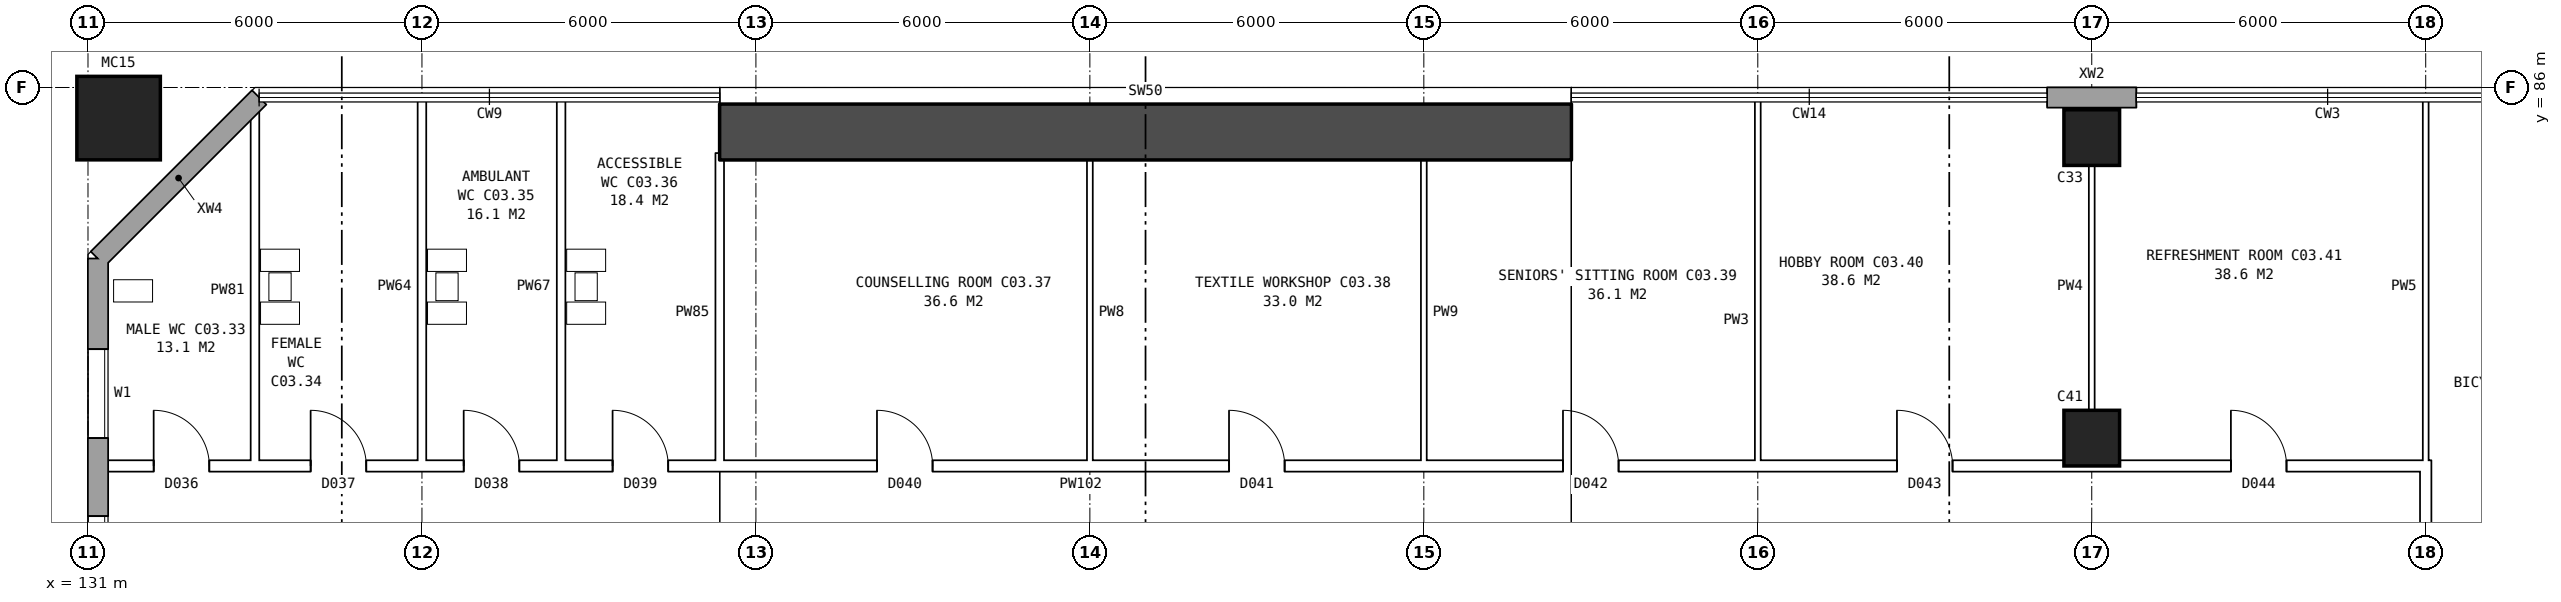
"""IFC4 building model, lengths in metres.
Left out: names, types, materials, properties, quantities, classifications, styles, units other than length and angle.
Written with IfcOpenShell. Run it as: python <this file> out.ifc"""

import sys

from ifc_helpers import new_model, si_unit, direction, frame, frame_2d, origin, origin_2d, place, context, subcontext, project, spatial, rectangle, hollow_rectangle, extrude, element, fill, save


model = new_model("IFC4")
c1 = context("Model", 3, precision=1e-05, world=origin(), true_north=direction((0.0, 1.0)))
c2 = subcontext(c1, "Body", "Model", "MODEL_VIEW")
j1 = project(units=[si_unit("LENGTHUNIT", "METRE"), si_unit("PLANEANGLEUNIT", "RADIAN")], contexts=[c1])
p1 = place(None, origin())
s1 = spatial("IfcSite", under=j1, at=p1, CompositionType="ELEMENT")
p2 = place(p1, origin())
s2 = spatial("IfcBuilding", under=s1, at=p2, CompositionType="ELEMENT")
p3 = place(p2, frame((0.0, 0.0, 14.7)))
s3 = spatial("IfcBuildingStorey", under=s2, at=p3, CompositionType="ELEMENT", Elevation=14.7)
p4 = place(p3, frame((142.35, 85.2, 0.0), z_axis=(0.0, 0.0, 1.0), x_axis=(1.0, 0.0, 0.0)))
e1 = element("IfcWall", 1, at=p4, inside=s3, PredefinedType="SHEAR", context=c2, shape_type="SweptSolid", body=[
    extrude(rectangle(XDim=15.3, YDim=1.0, at=frame_2d((7.65, 0.0))), origin(), (0.0, 0.0, 1.0), 4.0),
])
for number, where, z_axis, x_axis in (
    (2, (167.0, 79.7, 0.0), (0.0, 0.0, 1.0), (1.0, 0.0, 0.0)),
    (3, (167.0, 85.1, 0.0), (0.0, 0.0, 1.0), (1.0, 0.0, 0.0)),
):
    element("IfcColumn", number, at=place(p3, frame(where, z_axis=z_axis, x_axis=x_axis)), inside=s3, PredefinedType="COLUMN", context=c2, shape_type="SweptSolid", body=[
        extrude(rectangle(XDim=1.0, YDim=1.0, at=origin_2d()), origin(), (0.0, 0.0, 1.0), 4.0),
    ])
p5 = place(p3, frame((131.55, 85.45, 0.0), z_axis=(0.0, 0.0, 1.0), x_axis=(1.0, 0.0, 0.0)))
e4 = element("IfcColumn", 4, at=p5, inside=s3, PredefinedType="COLUMN", context=c2, shape_type="SweptSolid", body=[
    extrude(hollow_rectangle(XDim=1.5, YDim=1.5, WallThickness=0.08, at=origin_2d()), origin(), (0.0, 0.0, 1.0), 4.8),
])
p6 = place(p3, frame((167.8, 85.82, 0.0), z_axis=(0.0, 0.0, 1.0), x_axis=(-1.0, 0.0, 0.0)))
e5 = element("IfcWall", 5, at=p6, inside=s3, PredefinedType="STANDARD", context=c2, shape_type="SweptSolid", body=[
    extrude(rectangle(XDim=1.6, YDim=0.36, at=frame_2d((0.8, 0.0))), origin(), (0.0, 0.0, 1.0), 4.0),
])
p7 = place(p3, frame((134.075, 85.82, 0.0), z_axis=(0.0, 0.0, 1.0), x_axis=(-0.707106781187, -0.707106781187, 0.0)))
e6 = element("IfcWall", 6, at=p7, inside=s3, PredefinedType="STANDARD", context=c2, shape_type="SweptSolid", body=[
    extrude(rectangle(XDim=4.094, YDim=0.36, at=frame_2d((2.047, 0.0))), origin(), (0.0, 0.0, 1.0), 4.0),
])
p8 = place(p3, frame((131.18, 82.925, 0.0), z_axis=(0.0, 0.0, 1.0), x_axis=(0.0, -1.0, 0.0)))
e7 = element("IfcWall", 7, at=p8, inside=s3, PredefinedType="STANDARD", context=c2, shape_type="SweptSolid", body=[
    extrude(rectangle(XDim=25.851, YDim=0.36, at=frame_2d((12.925, 0.0))), origin(), (0.0, 0.0, 1.0), 4.0),
])
p9 = place(p8, frame((1.625, 0.0, 0.8)))
e8 = element("IfcOpeningElement", 8, at=p9, cuts=e7, PredefinedType="OPENING", context=c2, shape_type="SweptSolid", body=[
    extrude(rectangle(XDim=1.6, YDim=1.8, at=frame_2d((0.8, 0.9))), frame((0.0, 0.19, 0.0), z_axis=(0.0, -1.0, 0.0), x_axis=(1.0, 0.0, 0.0)), (0.0, 0.0, 1.0), 0.38),
])
p10 = place(p8, frame((4.625, 0.0, 0.8)))
e9 = element("IfcOpeningElement", 9, at=p10, cuts=e7, PredefinedType="OPENING", context=c2, shape_type="SweptSolid", body=[
    extrude(rectangle(XDim=1.6, YDim=1.8, at=frame_2d((0.8, 0.9))), frame((0.0, 0.19, 0.0), z_axis=(0.0, -1.0, 0.0), x_axis=(1.0, 0.0, 0.0)), (0.0, 0.0, 1.0), 0.38),
])
p11 = place(p8, frame((19.625, 0.0, 0.8)))
e10 = element("IfcOpeningElement", 10, at=p11, cuts=e7, PredefinedType="OPENING", context=c2, shape_type="SweptSolid", body=[
    extrude(rectangle(XDim=1.6, YDim=1.8, at=frame_2d((0.8, 0.9))), frame((0.0, 0.19, 0.0), z_axis=(0.0, -1.0, 0.0), x_axis=(1.0, 0.0, 0.0)), (0.0, 0.0, 1.0), 0.38),
])
p12 = place(p8, frame((22.625, 0.0, 0.8)))
e11 = element("IfcOpeningElement", 11, at=p12, cuts=e7, PredefinedType="OPENING", context=c2, shape_type="SweptSolid", body=[
    extrude(rectangle(XDim=1.6, YDim=1.8, at=frame_2d((0.8, 0.9))), frame((0.0, 0.19, 0.0), z_axis=(0.0, -1.0, 0.0), x_axis=(1.0, 0.0, 0.0)), (0.0, 0.0, 1.0), 0.38),
])
p13 = place(p3, frame((131.24, 79.2, 0.0), z_axis=(0.0, 0.0, 1.0), x_axis=(1.0, 0.0, 0.0)))
e12 = element("IfcWall", 12, at=p13, inside=s3, PredefinedType="PARTITIONING", context=c2, shape_type="SweptSolid", body=[
    extrude(rectangle(XDim=41.86, YDim=0.2, at=frame_2d((20.93, 0.0))), origin(), (0.0, 0.0, 1.0), 4.0),
])
p14 = place(p13, frame((0.94, 0.0, 0.0)))
e13 = element("IfcOpeningElement", 13, at=p14, cuts=e12, PredefinedType="OPENING", context=c2, shape_type="SweptSolid", body=[
    extrude(rectangle(XDim=1.0, YDim=2.1, at=frame_2d((0.5, 1.05))), frame((0.0, 0.11, 0.0), z_axis=(0.0, -1.0, 0.0), x_axis=(1.0, 0.0, 0.0)), (0.0, 0.0, 1.0), 0.22),
])
p15 = place(p13, frame((3.76, 0.0, 0.0)))
e14 = element("IfcOpeningElement", 14, at=p15, cuts=e12, PredefinedType="OPENING", context=c2, shape_type="SweptSolid", body=[
    extrude(rectangle(XDim=1.0, YDim=2.1, at=frame_2d((0.5, 1.05))), frame((0.0, 0.11, 0.0), z_axis=(0.0, -1.0, 0.0), x_axis=(1.0, 0.0, 0.0)), (0.0, 0.0, 1.0), 0.22),
])
p16 = place(p13, frame((6.51, 0.0, 0.0)))
e15 = element("IfcOpeningElement", 15, at=p16, cuts=e12, PredefinedType="OPENING", context=c2, shape_type="SweptSolid", body=[
    extrude(rectangle(XDim=1.0, YDim=2.1, at=frame_2d((0.5, 1.05))), frame((0.0, 0.11, 0.0), z_axis=(0.0, -1.0, 0.0), x_axis=(1.0, 0.0, 0.0)), (0.0, 0.0, 1.0), 0.22),
])
p17 = place(p13, frame((9.185, 0.0, 0.0)))
e16 = element("IfcOpeningElement", 16, at=p17, cuts=e12, PredefinedType="OPENING", context=c2, shape_type="SweptSolid", body=[
    extrude(rectangle(XDim=1.0, YDim=2.1, at=frame_2d((0.5, 1.05))), frame((0.0, 0.11, 0.0), z_axis=(0.0, -1.0, 0.0), x_axis=(1.0, 0.0, 0.0)), (0.0, 0.0, 1.0), 0.22),
])
p18 = place(p13, frame((13.935, 0.0, 0.0)))
e17 = element("IfcOpeningElement", 17, at=p18, cuts=e12, PredefinedType="OPENING", context=c2, shape_type="SweptSolid", body=[
    extrude(rectangle(XDim=1.0, YDim=2.1, at=frame_2d((0.5, 1.05))), frame((0.0, 0.11, 0.0), z_axis=(0.0, -1.0, 0.0), x_axis=(1.0, 0.0, 0.0)), (0.0, 0.0, 1.0), 0.22),
])
p19 = place(p13, frame((20.26, 0.0, 0.0)))
e18 = element("IfcOpeningElement", 18, at=p19, cuts=e12, PredefinedType="OPENING", context=c2, shape_type="SweptSolid", body=[
    extrude(rectangle(XDim=1.0, YDim=2.1, at=frame_2d((0.5, 1.05))), frame((0.0, 0.11, 0.0), z_axis=(0.0, -1.0, 0.0), x_axis=(1.0, 0.0, 0.0)), (0.0, 0.0, 1.0), 0.22),
])
p20 = place(p13, frame((26.26, 0.0, 0.0)))
e19 = element("IfcOpeningElement", 19, at=p20, cuts=e12, PredefinedType="OPENING", context=c2, shape_type="SweptSolid", body=[
    extrude(rectangle(XDim=1.0, YDim=2.1, at=frame_2d((0.5, 1.05))), frame((0.0, 0.11, 0.0), z_axis=(0.0, -1.0, 0.0), x_axis=(1.0, 0.0, 0.0)), (0.0, 0.0, 1.0), 0.22),
])
p21 = place(p13, frame((32.26, 0.0, 0.0)))
e20 = element("IfcOpeningElement", 20, at=p21, cuts=e12, PredefinedType="OPENING", context=c2, shape_type="SweptSolid", body=[
    extrude(rectangle(XDim=1.0, YDim=2.1, at=frame_2d((0.5, 1.05))), frame((0.0, 0.11, 0.0), z_axis=(0.0, -1.0, 0.0), x_axis=(1.0, 0.0, 0.0)), (0.0, 0.0, 1.0), 0.22),
])
p22 = place(p13, frame((38.26, 0.0, 0.0)))
e21 = element("IfcOpeningElement", 21, at=p22, cuts=e12, PredefinedType="OPENING", context=c2, shape_type="SweptSolid", body=[
    extrude(rectangle(XDim=1.0, YDim=2.1, at=frame_2d((0.5, 1.05))), frame((0.0, 0.11, 0.0), z_axis=(0.0, -1.0, 0.0), x_axis=(1.0, 0.0, 0.0)), (0.0, 0.0, 1.0), 0.22),
])
p23 = place(p3, frame((134.0, 79.1, 0.0), z_axis=(0.0, 0.0, 1.0), x_axis=(0.0, 1.0, 0.0)))
e22 = element("IfcWall", 22, at=p23, inside=s3, PredefinedType="PLUMBINGWALL", context=c2, shape_type="SweptSolid", body=[
    extrude(rectangle(XDim=6.511, YDim=0.15, at=frame_2d((3.255, 0.0))), origin(), (0.0, 0.0, 1.0), 4.0),
])
for number, where, z_axis, x_axis in (
    (23, (137.0, 79.1, 0.0), (0.0, 0.0, 1.0), (0.0, 1.0, 0.0)),
    (24, (139.5, 79.1, 0.0), (0.0, 0.0, 1.0), (0.0, 1.0, 0.0)),
):
    element("IfcWall", number, at=place(p3, frame(where, z_axis=z_axis, x_axis=x_axis)), inside=s3, PredefinedType="PLUMBINGWALL", context=c2, shape_type="SweptSolid", body=[
        extrude(rectangle(XDim=6.66, YDim=0.15, at=frame_2d((3.33, 0.0))), origin(), (0.0, 0.0, 1.0), 4.0),
    ])
p24 = place(p3, frame((142.35, 79.1, 0.0), z_axis=(0.0, 0.0, 1.0), x_axis=(0.0, 1.0, 0.0)))
e25 = element("IfcWall", 25, at=p24, inside=s3, PredefinedType="PLUMBINGWALL", context=c2, shape_type="SweptSolid", body=[
    extrude(rectangle(XDim=5.72, YDim=0.15, at=frame_2d((2.86, 0.0))), origin(), (0.0, 0.0, 1.0), 4.0),
])
for number, where, z_axis, x_axis in (
    (26, (149.0, 79.1, 0.0), (0.0, 0.0, 1.0), (0.0, 1.0, 0.0)),
    (27, (155.0, 79.1, 0.0), (0.0, 0.0, 1.0), (0.0, 1.0, 0.0)),
):
    element("IfcWall", number, at=place(p3, frame(where, z_axis=z_axis, x_axis=x_axis)), inside=s3, PredefinedType="PARTITIONING", context=c2, shape_type="SweptSolid", body=[
        extrude(rectangle(XDim=5.72, YDim=0.1, at=frame_2d((2.86, 0.0))), origin(), (0.0, 0.0, 1.0), 4.0),
    ])
for number, where, z_axis, x_axis in (
    (28, (161.0, 79.1, 0.0), (0.0, 0.0, 1.0), (0.0, 1.0, 0.0)),
    (29, (167.0, 79.1, 0.0), (0.0, 0.0, 1.0), (0.0, 1.0, 0.0)),
):
    element("IfcWall", number, at=place(p3, frame(where, z_axis=z_axis, x_axis=x_axis)), inside=s3, PredefinedType="PARTITIONING", context=c2, shape_type="SweptSolid", body=[
        extrude(rectangle(XDim=6.66, YDim=0.1, at=frame_2d((3.33, 0.0))), origin(), (0.0, 0.0, 1.0), 4.0),
    ])
p25 = place(p3, frame((173.0, 60.7, 0.0), z_axis=(0.0, 0.0, 1.0), x_axis=(0.0, 1.0, 0.0)))
e30 = element("IfcWall", 30, at=p25, inside=s3, PredefinedType="PARTITIONING", context=c2, shape_type="SweptSolid", body=[
    extrude(rectangle(XDim=18.6, YDim=0.2, at=frame_2d((9.3, 0.0))), origin(), (0.0, 0.0, 1.0), 4.0),
])
p26 = place(p25, frame((1.2, 0.0, 0.0)))
e31 = element("IfcOpeningElement", 31, at=p26, cuts=e30, PredefinedType="OPENING", context=c2, shape_type="SweptSolid", body=[
    extrude(rectangle(XDim=1.0, YDim=2.1, at=frame_2d((0.5, 1.05))), frame((0.0, 0.11, 0.0), z_axis=(0.0, -1.0, 0.0), x_axis=(1.0, 0.0, 0.0)), (0.0, 0.0, 1.0), 0.22),
])
p27 = place(p25, frame((5.8, 0.0, 0.0)))
e32 = element("IfcOpeningElement", 32, at=p27, cuts=e30, PredefinedType="OPENING", context=c2, shape_type="SweptSolid", body=[
    extrude(rectangle(XDim=1.0, YDim=2.1, at=frame_2d((0.5, 1.05))), frame((0.0, 0.11, 0.0), z_axis=(0.0, -1.0, 0.0), x_axis=(1.0, 0.0, 0.0)), (0.0, 0.0, 1.0), 0.22),
])
p28 = place(p25, frame((11.8, 0.0, 0.0)))
e33 = element("IfcOpeningElement", 33, at=p28, cuts=e30, PredefinedType="OPENING", context=c2, shape_type="SweptSolid", body=[
    extrude(rectangle(XDim=1.0, YDim=2.1, at=frame_2d((0.5, 1.05))), frame((0.0, 0.11, 0.0), z_axis=(0.0, -1.0, 0.0), x_axis=(1.0, 0.0, 0.0)), (0.0, 0.0, 1.0), 0.22),
])
p29 = place(p25, frame((16.4, 0.0, 0.0)))
e34 = element("IfcOpeningElement", 34, at=p29, cuts=e30, PredefinedType="OPENING", context=c2, shape_type="SweptSolid", body=[
    extrude(rectangle(XDim=1.0, YDim=2.1, at=frame_2d((0.5, 1.05))), frame((0.0, 0.11, 0.0), z_axis=(0.0, -1.0, 0.0), x_axis=(1.0, 0.0, 0.0)), (0.0, 0.0, 1.0), 0.22),
])
p30 = place(p3, frame((173.0, 79.1, 0.0), z_axis=(0.0, 0.0, 1.0), x_axis=(0.0, 1.0, 0.0)))
e35 = element("IfcWall", 35, at=p30, inside=s3, PredefinedType="PARTITIONING", context=c2, shape_type="SweptSolid", body=[
    extrude(rectangle(XDim=6.66, YDim=0.1, at=frame_2d((3.33, 0.0))), origin(), (0.0, 0.0, 1.0), 4.0),
])
p31 = place(p9, origin())
e36 = element("IfcWindow", 36, at=p31, inside=s3, PartitioningType="SINGLE_PANEL", PredefinedType="WINDOW", context=c2, shape_type="SweptSolid", body=[
    extrude(rectangle(XDim=1.6, YDim=1.8, at=frame_2d((0.8, 0.9))), frame((0.0, 0.15, 0.0), z_axis=(0.0, -1.0, 0.0), x_axis=(1.0, 0.0, 0.0)), (0.0, 0.0, 1.0), 0.06),
])
fill(e8, e36)
p32 = place(p10, origin())
e37 = element("IfcWindow", 37, at=p32, inside=s3, PartitioningType="SINGLE_PANEL", PredefinedType="WINDOW", context=c2, shape_type="SweptSolid", body=[
    extrude(rectangle(XDim=1.6, YDim=1.8, at=frame_2d((0.8, 0.9))), frame((0.0, 0.15, 0.0), z_axis=(0.0, -1.0, 0.0), x_axis=(1.0, 0.0, 0.0)), (0.0, 0.0, 1.0), 0.06),
])
fill(e9, e37)
p33 = place(p14, origin())
e38 = element("IfcDoor", 38, at=p33, inside=s3, OperationType="SINGLE_SWING_LEFT", PredefinedType="DOOR", context=c2, shape_type="SweptSolid", body=[
    extrude(rectangle(XDim=1.0, YDim=2.1, at=frame_2d((0.5, 1.05))), frame((0.0, 0.025, 0.0), z_axis=(0.0, -1.0, 0.0), x_axis=(1.0, 0.0, 0.0)), (0.0, 0.0, 1.0), 0.05),
])
fill(e13, e38)
p34 = place(p15, origin())
e39 = element("IfcDoor", 39, at=p34, inside=s3, OperationType="SINGLE_SWING_LEFT", PredefinedType="DOOR", context=c2, shape_type="SweptSolid", body=[
    extrude(rectangle(XDim=1.0, YDim=2.1, at=frame_2d((0.5, 1.05))), frame((0.0, 0.025, 0.0), z_axis=(0.0, -1.0, 0.0), x_axis=(1.0, 0.0, 0.0)), (0.0, 0.0, 1.0), 0.05),
])
fill(e14, e39)
p35 = place(p16, origin())
e40 = element("IfcDoor", 40, at=p35, inside=s3, OperationType="SINGLE_SWING_LEFT", PredefinedType="DOOR", context=c2, shape_type="SweptSolid", body=[
    extrude(rectangle(XDim=1.0, YDim=2.1, at=frame_2d((0.5, 1.05))), frame((0.0, 0.025, 0.0), z_axis=(0.0, -1.0, 0.0), x_axis=(1.0, 0.0, 0.0)), (0.0, 0.0, 1.0), 0.05),
])
fill(e15, e40)
p36 = place(p17, origin())
e41 = element("IfcDoor", 41, at=p36, inside=s3, OperationType="SINGLE_SWING_LEFT", PredefinedType="DOOR", context=c2, shape_type="SweptSolid", body=[
    extrude(rectangle(XDim=1.0, YDim=2.1, at=frame_2d((0.5, 1.05))), frame((0.0, 0.025, 0.0), z_axis=(0.0, -1.0, 0.0), x_axis=(1.0, 0.0, 0.0)), (0.0, 0.0, 1.0), 0.05),
])
fill(e16, e41)
p37 = place(p18, origin())
e42 = element("IfcDoor", 42, at=p37, inside=s3, OperationType="SINGLE_SWING_LEFT", PredefinedType="DOOR", context=c2, shape_type="SweptSolid", body=[
    extrude(rectangle(XDim=1.0, YDim=2.1, at=frame_2d((0.5, 1.05))), frame((0.0, 0.025, 0.0), z_axis=(0.0, -1.0, 0.0), x_axis=(1.0, 0.0, 0.0)), (0.0, 0.0, 1.0), 0.05),
])
fill(e17, e42)
p38 = place(p19, origin())
e43 = element("IfcDoor", 43, at=p38, inside=s3, OperationType="SINGLE_SWING_LEFT", PredefinedType="DOOR", context=c2, shape_type="SweptSolid", body=[
    extrude(rectangle(XDim=1.0, YDim=2.1, at=frame_2d((0.5, 1.05))), frame((0.0, 0.025, 0.0), z_axis=(0.0, -1.0, 0.0), x_axis=(1.0, 0.0, 0.0)), (0.0, 0.0, 1.0), 0.05),
])
fill(e18, e43)
p39 = place(p20, origin())
e44 = element("IfcDoor", 44, at=p39, inside=s3, OperationType="SINGLE_SWING_LEFT", PredefinedType="DOOR", context=c2, shape_type="SweptSolid", body=[
    extrude(rectangle(XDim=1.0, YDim=2.1, at=frame_2d((0.5, 1.05))), frame((0.0, 0.025, 0.0), z_axis=(0.0, -1.0, 0.0), x_axis=(1.0, 0.0, 0.0)), (0.0, 0.0, 1.0), 0.05),
])
fill(e19, e44)
p40 = place(p21, origin())
e45 = element("IfcDoor", 45, at=p40, inside=s3, OperationType="SINGLE_SWING_LEFT", PredefinedType="DOOR", context=c2, shape_type="SweptSolid", body=[
    extrude(rectangle(XDim=1.0, YDim=2.1, at=frame_2d((0.5, 1.05))), frame((0.0, 0.025, 0.0), z_axis=(0.0, -1.0, 0.0), x_axis=(1.0, 0.0, 0.0)), (0.0, 0.0, 1.0), 0.05),
])
fill(e20, e45)
p41 = place(p22, origin())
e46 = element("IfcDoor", 46, at=p41, inside=s3, OperationType="SINGLE_SWING_LEFT", PredefinedType="DOOR", context=c2, shape_type="SweptSolid", body=[
    extrude(rectangle(XDim=1.0, YDim=2.1, at=frame_2d((0.5, 1.05))), frame((0.0, 0.025, 0.0), z_axis=(0.0, -1.0, 0.0), x_axis=(1.0, 0.0, 0.0)), (0.0, 0.0, 1.0), 0.05),
])
fill(e21, e46)
save(model, sys.argv[1])
